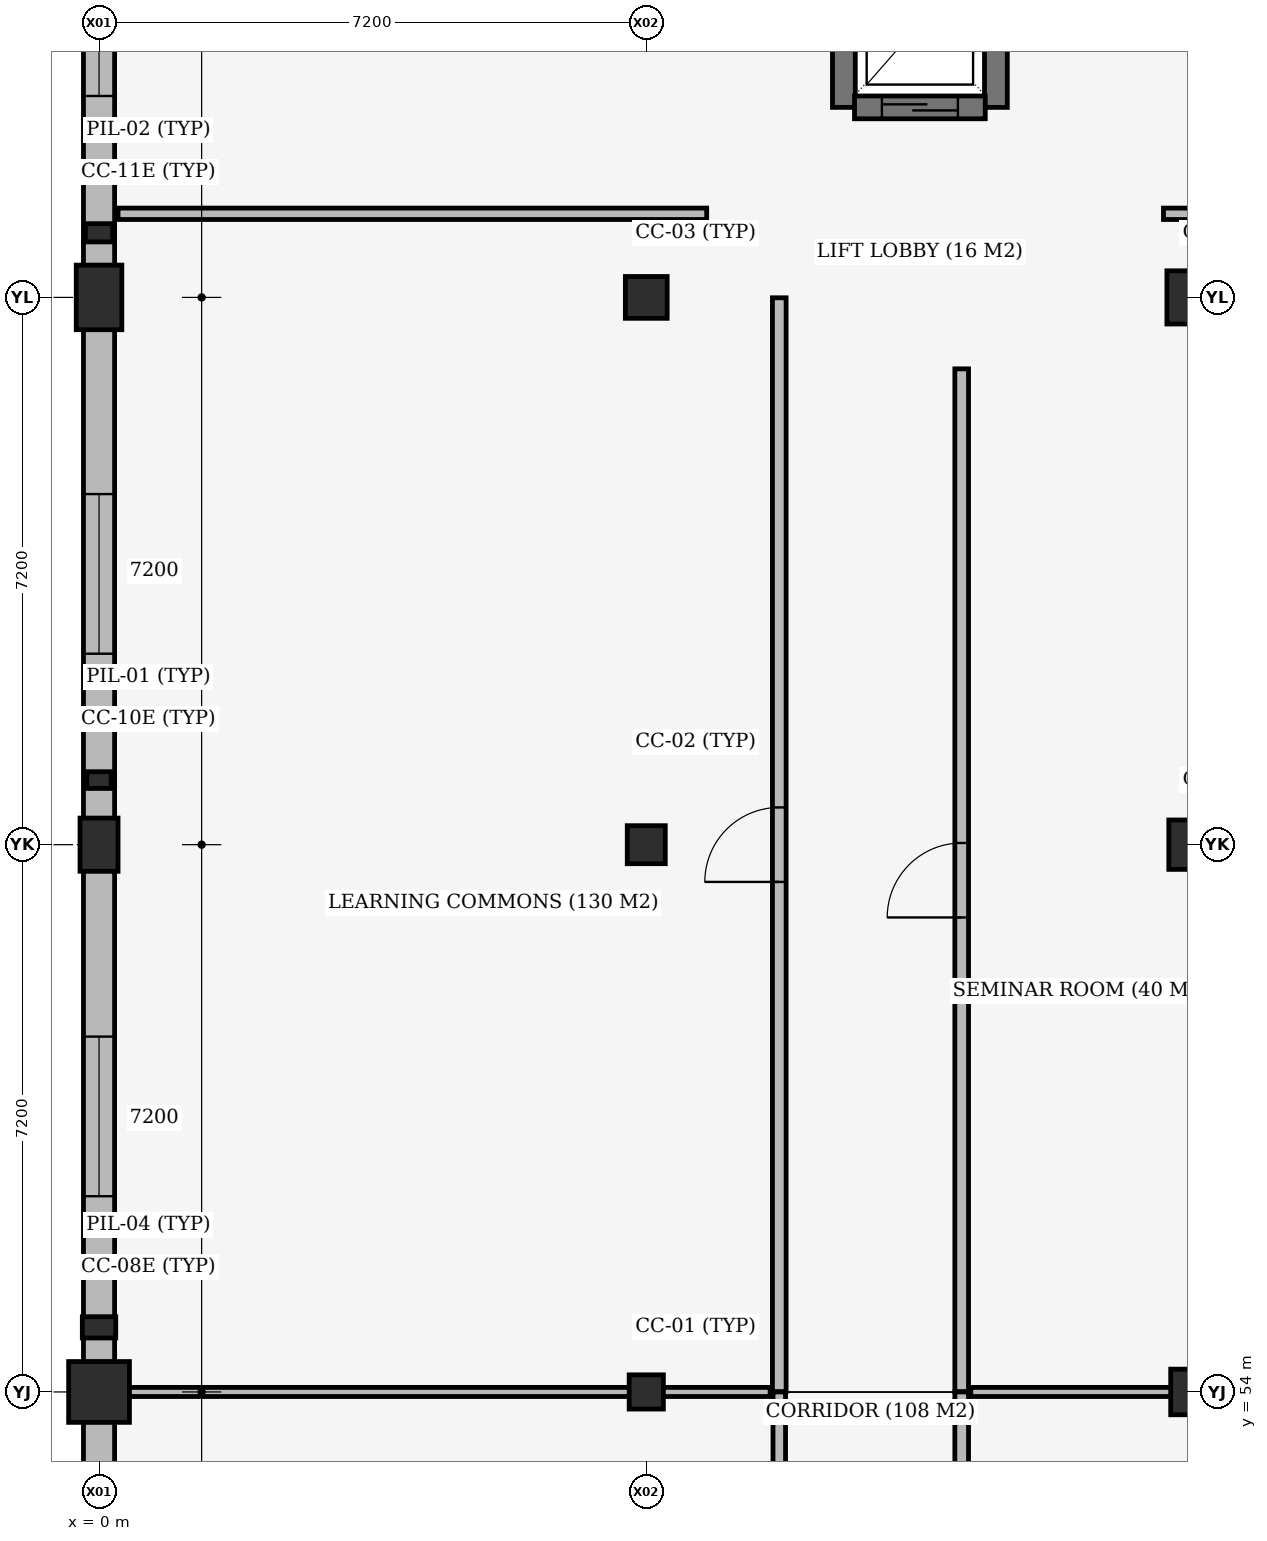
"""IFC4 building model, lengths in metres.
Left out: names, types, materials, properties, quantities, classifications, styles, units other than length and angle.
Written with IfcOpenShell. Run it as: python <this file> out.ifc"""

import sys

from ifc_helpers import new_model, si_unit, direction, frame, frame_2d, origin, origin_2d, place, context, subcontext, project, spatial, rectangle, extrude, element, fill, save


model = new_model("IFC4")
c1 = context("Model", 3, precision=1e-05, world=origin(), true_north=direction((0.0, 1.0)))
c2 = subcontext(c1, "Body", "Model", "MODEL_VIEW")
j1 = project(units=[si_unit("LENGTHUNIT", "METRE"), si_unit("PLANEANGLEUNIT", "RADIAN")], contexts=[c1])
p1 = place(None, origin())
s1 = spatial("IfcSite", under=j1, at=p1, CompositionType="ELEMENT")
p2 = place(p1, origin())
s2 = spatial("IfcBuilding", under=s1, at=p2, CompositionType="ELEMENT")
p3 = place(p2, origin())
s3 = spatial("IfcBuildingStorey", under=s2, at=p3, CompositionType="ELEMENT", Elevation=0.0)
p4 = place(p3, frame((0.0, 54.0, 0.0), z_axis=(0.0, 0.0, 1.0), x_axis=(1.0, 0.0, 0.0)))
e1 = element("IfcColumn", 1, at=p4, inside=s3, PredefinedType="COLUMN", context=c2, shape_type="SweptSolid", body=[
    extrude(rectangle(XDim=0.8, YDim=0.8, at=origin_2d()), origin(), (0.0, 0.0, 1.0), 5.1),
])
p5 = place(p3, frame((0.0, 61.2, 0.0), z_axis=(0.0, 0.0, 1.0), x_axis=(1.0, 0.0, 0.0)))
e2 = element("IfcColumn", 2, at=p5, inside=s3, PredefinedType="COLUMN", context=c2, shape_type="SweptSolid", body=[
    extrude(rectangle(XDim=0.5, YDim=0.7, at=origin_2d()), origin(), (0.0, 0.0, 1.0), 5.1),
])
p6 = place(p3, frame((0.0, 68.4, 0.0), z_axis=(0.0, 0.0, 1.0), x_axis=(1.0, 0.0, 0.0)))
e3 = element("IfcColumn", 3, at=p6, inside=s3, PredefinedType="COLUMN", context=c2, shape_type="SweptSolid", body=[
    extrude(rectangle(XDim=0.6, YDim=0.85, at=origin_2d()), origin(), (0.0, 0.0, 1.0), 5.1),
])
p7 = place(p3, frame((7.2, 54.0, 0.0), z_axis=(0.0, 0.0, 1.0), x_axis=(1.0, 0.0, 0.0)))
e4 = element("IfcColumn", 4, at=p7, inside=s3, PredefinedType="COLUMN", context=c2, shape_type="SweptSolid", body=[
    extrude(rectangle(XDim=0.45, YDim=0.45, at=origin_2d()), origin(), (0.0, 0.0, 1.0), 5.1),
])
p8 = place(p3, frame((7.2, 61.2, 0.0), z_axis=(0.0, 0.0, 1.0), x_axis=(1.0, 0.0, 0.0)))
e5 = element("IfcColumn", 5, at=p8, inside=s3, PredefinedType="COLUMN", context=c2, shape_type="SweptSolid", body=[
    extrude(rectangle(XDim=0.5, YDim=0.5, at=origin_2d()), origin(), (0.0, 0.0, 1.0), 5.1),
])
p9 = place(p3, frame((7.2, 68.4, 0.0), z_axis=(0.0, 0.0, 1.0), x_axis=(1.0, 0.0, 0.0)))
e6 = element("IfcColumn", 6, at=p9, inside=s3, PredefinedType="COLUMN", context=c2, shape_type="SweptSolid", body=[
    extrude(rectangle(XDim=0.55, YDim=0.55, at=origin_2d()), origin(), (0.0, 0.0, 1.0), 5.1),
])
p10 = place(p3, frame((14.4, 54.0, 0.0), z_axis=(0.0, 0.0, 1.0), x_axis=(1.0, 0.0, 0.0)))
e7 = element("IfcColumn", 7, at=p10, inside=s3, PredefinedType="COLUMN", context=c2, shape_type="SweptSolid", body=[
    extrude(rectangle(XDim=0.6, YDim=0.6, at=origin_2d()), origin(), (0.0, 0.0, 1.0), 5.1),
])
p11 = place(p3, frame((14.4, 61.2, 0.0), z_axis=(0.0, 0.0, 1.0), x_axis=(1.0, 0.0, 0.0)))
e8 = element("IfcColumn", 8, at=p11, inside=s3, PredefinedType="COLUMN", context=c2, shape_type="SweptSolid", body=[
    extrude(rectangle(XDim=0.65, YDim=0.65, at=origin_2d()), origin(), (0.0, 0.0, 1.0), 5.1),
])
p12 = place(p3, frame((14.4, 68.4, 0.0), z_axis=(0.0, 0.0, 1.0), x_axis=(1.0, 0.0, 0.0)))
e9 = element("IfcColumn", 9, at=p12, inside=s3, PredefinedType="COLUMN", context=c2, shape_type="SweptSolid", body=[
    extrude(rectangle(XDim=0.7, YDim=0.7, at=origin_2d()), origin(), (0.0, 0.0, 1.0), 5.1),
])
p13 = place(p3, frame((0.0, 54.85, 0.0), z_axis=(0.0, 0.0, 1.0), x_axis=(1.0, 0.0, 0.0)))
e10 = element("IfcColumn", 10, at=p13, inside=s3, PredefinedType="PILASTER", context=c2, shape_type="SweptSolid", body=[
    extrude(rectangle(XDim=0.44, YDim=0.28, at=origin_2d()), origin(), (0.0, 0.0, 1.0), 5.1),
])
p14 = place(p3, frame((0.0, 62.05, 0.0), z_axis=(0.0, 0.0, 1.0), x_axis=(1.0, 0.0, 0.0)))
e11 = element("IfcColumn", 11, at=p14, inside=s3, PredefinedType="PILASTER", context=c2, shape_type="SweptSolid", body=[
    extrude(rectangle(XDim=0.32, YDim=0.22, at=origin_2d()), origin(), (0.0, 0.0, 1.0), 5.1),
])
p15 = place(p3, frame((0.0, 69.25, 0.0), z_axis=(0.0, 0.0, 1.0), x_axis=(1.0, 0.0, 0.0)))
e12 = element("IfcColumn", 12, at=p15, inside=s3, PredefinedType="PILASTER", context=c2, shape_type="SweptSolid", body=[
    extrude(rectangle(XDim=0.36, YDim=0.24, at=origin_2d()), origin(), (0.0, 0.0, 1.0), 5.1),
])
for number, where, z_axis, x_axis in (
    (13, (9.8, 73.1, 0.0), (0.0, 0.0, 1.0), (0.0, -1.0, 0.0)),
    (14, (11.8, 70.9, 0.0), (0.0, 0.0, 1.0), (0.0, 1.0, 0.0)),
):
    element("IfcWall", number, at=place(p3, frame(where, z_axis=z_axis, x_axis=x_axis)), inside=s3, PredefinedType="SHEAR", context=c2, shape_type="SweptSolid", body=[
        extrude(rectangle(XDim=2.2, YDim=0.3, at=frame_2d((1.1, 0.0))), origin(), (0.0, 0.0, 1.0), 5.1),
    ])
p16 = place(p3, frame((0.0, 43.567, 0.0), z_axis=(0.0, 0.0, 1.0), x_axis=(0.0, 1.0, 0.0)))
e15 = element("IfcWall", 15, at=p16, inside=s3, PredefinedType="STANDARD", context=c2, shape_type="SweptSolid", body=[
    extrude(rectangle(XDim=10.041, YDim=0.41, at=frame_2d((5.021, 0.0))), origin(), (0.0, 0.0, 1.0), 4.5),
])
p17 = place(p16, frame((3.97, 0.0, 0.8)))
e16 = element("IfcOpeningElement", 16, at=p17, cuts=e15, PredefinedType="OPENING", context=c2, shape_type="SweptSolid", body=[
    extrude(rectangle(XDim=2.1, YDim=3.0, at=frame_2d((1.05, 1.5))), frame((0.0, 0.215, 0.0), z_axis=(0.0, -1.0, 0.0), x_axis=(1.0, 0.0, 0.0)), (0.0, 0.0, 1.0), 0.43),
])
p18 = place(p3, frame((0.0, 54.392, 0.0), z_axis=(0.0, 0.0, 1.0), x_axis=(0.0, 1.0, 0.0)))
e17 = element("IfcWall", 17, at=p18, inside=s3, PredefinedType="STANDARD", context=c2, shape_type="SweptSolid", body=[
    extrude(rectangle(XDim=6.466, YDim=0.41, at=frame_2d((3.233, 0.0))), origin(), (0.0, 0.0, 1.0), 4.45),
])
p19 = place(p18, frame((2.183, 0.0, 0.8)))
e18 = element("IfcOpeningElement", 18, at=p19, cuts=e17, PredefinedType="OPENING", context=c2, shape_type="SweptSolid", body=[
    extrude(rectangle(XDim=2.1, YDim=3.0, at=frame_2d((1.05, 1.5))), frame((0.0, 0.215, 0.0), z_axis=(0.0, -1.0, 0.0), x_axis=(1.0, 0.0, 0.0)), (0.0, 0.0, 1.0), 0.43),
])
p20 = place(p3, frame((0.0, 61.542, 0.0), z_axis=(0.0, 0.0, 1.0), x_axis=(0.0, 1.0, 0.0)))
e19 = element("IfcWall", 19, at=p20, inside=s3, PredefinedType="STANDARD", context=c2, shape_type="SweptSolid", body=[
    extrude(rectangle(XDim=6.441, YDim=0.41, at=frame_2d((3.22, 0.0))), origin(), (0.0, 0.0, 1.0), 4.4),
])
p21 = place(p20, frame((2.17, 0.0, 0.8)))
e20 = element("IfcOpeningElement", 20, at=p21, cuts=e19, PredefinedType="OPENING", context=c2, shape_type="SweptSolid", body=[
    extrude(rectangle(XDim=2.1, YDim=3.0, at=frame_2d((1.05, 1.5))), frame((0.0, 0.215, 0.0), z_axis=(0.0, -1.0, 0.0), x_axis=(1.0, 0.0, 0.0)), (0.0, 0.0, 1.0), 0.43),
])
p22 = place(p3, frame((0.0, 68.817, 0.0), z_axis=(0.0, 0.0, 1.0), x_axis=(0.0, 1.0, 0.0)))
e21 = element("IfcWall", 21, at=p22, inside=s3, PredefinedType="STANDARD", context=c2, shape_type="SweptSolid", body=[
    extrude(rectangle(XDim=6.566, YDim=0.41, at=frame_2d((3.283, 0.0))), origin(), (0.0, 0.0, 1.0), 4.35),
])
p23 = place(p22, frame((2.233, 0.0, 0.8)))
e22 = element("IfcOpeningElement", 22, at=p23, cuts=e21, PredefinedType="OPENING", context=c2, shape_type="SweptSolid", body=[
    extrude(rectangle(XDim=2.1, YDim=3.0, at=frame_2d((1.05, 1.5))), frame((0.0, 0.215, 0.0), z_axis=(0.0, -1.0, 0.0), x_axis=(1.0, 0.0, 0.0)), (0.0, 0.0, 1.0), 0.43),
])
p24 = place(p3, frame((11.66, 70.9, 0.0), z_axis=(0.0, 0.0, 1.0), x_axis=(-1.0, 0.0, 0.0)))
e23 = element("IfcWall", 23, at=p24, inside=s3, PredefinedType="SHEAR", context=c2, shape_type="SweptSolid", body=[
    extrude(rectangle(XDim=1.72, YDim=0.3, at=frame_2d((0.86, 0.0))), origin(), (0.0, 0.0, 1.0), 5.1),
])
p25 = place(p24, frame((0.36, 0.0, 0.0)))
e24 = element("IfcOpeningElement", 24, at=p25, cuts=e23, PredefinedType="OPENING", context=c2, shape_type="SweptSolid", body=[
    extrude(rectangle(XDim=1.0, YDim=2.1, at=frame_2d((0.5, 1.05))), frame((0.0, 0.16, 0.0), z_axis=(0.0, -1.0, 0.0), x_axis=(1.0, 0.0, 0.0)), (0.0, 0.0, 1.0), 0.32),
])
p26 = place(p3, frame((8.95, 43.205, 0.0), z_axis=(0.0, 0.0, 1.0), x_axis=(0.0, 1.0, 0.0)))
e25 = element("IfcWall", 25, at=p26, inside=s3, PredefinedType="PARTITIONING", context=c2, shape_type="SweptSolid", body=[
    extrude(rectangle(XDim=10.795, YDim=0.165, at=frame_2d((5.397, 0.0))), origin(), (0.0, 0.0, 1.0), 4.3),
])
p27 = place(p26, frame((4.867, 0.0, 0.0)))
e26 = element("IfcOpeningElement", 26, at=p27, cuts=e25, PredefinedType="OPENING", context=c2, shape_type="SweptSolid", body=[
    extrude(rectangle(XDim=1.06, YDim=2.2, at=frame_2d((0.53, 1.1))), frame((0.0, 0.093, 0.0), z_axis=(0.0, -1.0, 0.0), x_axis=(1.0, 0.0, 0.0)), (0.0, 0.0, 1.0), 0.185),
])
p28 = place(p3, frame((0.25, 54.0, 0.0), z_axis=(0.0, 0.0, 1.0), x_axis=(1.0, 0.0, 0.0)))
e27 = element("IfcWall", 27, at=p28, inside=s3, PredefinedType="PARTITIONING", context=c2, shape_type="SweptSolid", body=[
    extrude(rectangle(XDim=8.58, YDim=0.12, at=frame_2d((4.29, 0.0))), origin(), (0.0, 0.0, 1.0), 4.35),
])
p29 = place(p3, frame((8.95, 54.005, 0.0), z_axis=(0.0, 0.0, 1.0), x_axis=(0.0, 1.0, 0.0)))
e28 = element("IfcWall", 28, at=p29, inside=s3, PredefinedType="PARTITIONING", context=c2, shape_type="SweptSolid", body=[
    extrude(rectangle(XDim=14.39, YDim=0.18, at=frame_2d((7.195, 0.0))), origin(), (0.0, 0.0, 1.0), 4.35),
])
p30 = place(p29, frame((6.705, 0.0, 0.0)))
e29 = element("IfcOpeningElement", 29, at=p30, cuts=e28, PredefinedType="OPENING", context=c2, shape_type="SweptSolid", body=[
    extrude(rectangle(XDim=0.98, YDim=2.18, at=frame_2d((0.49, 1.09))), frame((0.0, 0.1, 0.0), z_axis=(0.0, -1.0, 0.0), x_axis=(1.0, 0.0, 0.0)), (0.0, 0.0, 1.0), 0.2),
])
p31 = place(p3, frame((0.25, 69.5, 0.0), z_axis=(0.0, 0.0, 1.0), x_axis=(1.0, 0.0, 0.0)))
e30 = element("IfcWall", 30, at=p31, inside=s3, PredefinedType="PARTITIONING", context=c2, shape_type="SweptSolid", body=[
    extrude(rectangle(XDim=7.745, YDim=0.15, at=frame_2d((3.873, 0.0))), origin(), (0.0, 0.0, 1.0), 4.3),
])
p32 = place(p3, frame((11.35, 41.605, 0.0), z_axis=(0.0, 0.0, 1.0), x_axis=(0.0, 1.0, 0.0)))
e31 = element("IfcWall", 31, at=p32, inside=s3, PredefinedType="PARTITIONING", context=c2, shape_type="SweptSolid", body=[
    extrude(rectangle(XDim=12.395, YDim=0.18, at=frame_2d((6.198, 0.0))), origin(), (0.0, 0.0, 1.0), 4.3),
])
p33 = place(p32, frame((5.702, 0.0, 0.0)))
e32 = element("IfcOpeningElement", 32, at=p33, cuts=e31, PredefinedType="OPENING", context=c2, shape_type="SweptSolid", body=[
    extrude(rectangle(XDim=0.99, YDim=2.18, at=frame_2d((0.495, 1.09))), frame((0.0, 0.1, 0.0), z_axis=(0.0, -1.0, 0.0), x_axis=(1.0, 0.0, 0.0)), (0.0, 0.0, 1.0), 0.2),
])
p34 = place(p3, frame((11.47, 54.0, 0.0), z_axis=(0.0, 0.0, 1.0), x_axis=(1.0, 0.0, 0.0)))
e33 = element("IfcWall", 33, at=p34, inside=s3, PredefinedType="PARTITIONING", context=c2, shape_type="SweptSolid", body=[
    extrude(rectangle(XDim=3.01, YDim=0.12, at=frame_2d((1.505, 0.0))), origin(), (0.0, 0.0, 1.0), 4.3),
])
p35 = place(p3, frame((11.35, 54.005, 0.0), z_axis=(0.0, 0.0, 1.0), x_axis=(0.0, 1.0, 0.0)))
e34 = element("IfcWall", 34, at=p35, inside=s3, PredefinedType="PARTITIONING", context=c2, shape_type="SweptSolid", body=[
    extrude(rectangle(XDim=13.455, YDim=0.18, at=frame_2d((6.728, 0.0))), origin(), (0.0, 0.0, 1.0), 4.35),
])
p36 = place(p35, frame((6.238, 0.0, 0.0)))
e35 = element("IfcOpeningElement", 35, at=p36, cuts=e34, PredefinedType="OPENING", context=c2, shape_type="SweptSolid", body=[
    extrude(rectangle(XDim=0.98, YDim=2.18, at=frame_2d((0.49, 1.09))), frame((0.0, 0.1, 0.0), z_axis=(0.0, -1.0, 0.0), x_axis=(1.0, 0.0, 0.0)), (0.0, 0.0, 1.0), 0.2),
])
p37 = place(p3, frame((14.005, 69.5, 0.0), z_axis=(0.0, 0.0, 1.0), x_axis=(1.0, 0.0, 0.0)))
e36 = element("IfcWall", 36, at=p37, inside=s3, PredefinedType="PARTITIONING", context=c2, shape_type="SweptSolid", body=[
    extrude(rectangle(XDim=16.375, YDim=0.15, at=frame_2d((8.188, 0.0))), origin(), (0.0, 0.0, 1.0), 4.3),
])
p38 = place(p19, origin())
e37 = element("IfcWindow", 37, at=p38, inside=s3, PartitioningType="DOUBLE_PANEL_VERTICAL", PredefinedType="WINDOW", context=c2, shape_type="SweptSolid", body=[
    extrude(rectangle(XDim=2.1, YDim=3.0, at=frame_2d((1.05, 1.5))), frame((0.0, 0.03, 0.0), z_axis=(0.0, -1.0, 0.0), x_axis=(1.0, 0.0, 0.0)), (0.0, 0.0, 1.0), 0.06),
])
fill(e18, e37)
p39 = place(p21, origin())
e38 = element("IfcWindow", 38, at=p39, inside=s3, PartitioningType="DOUBLE_PANEL_VERTICAL", PredefinedType="WINDOW", context=c2, shape_type="SweptSolid", body=[
    extrude(rectangle(XDim=2.1, YDim=3.0, at=frame_2d((1.05, 1.5))), frame((0.0, 0.03, 0.0), z_axis=(0.0, -1.0, 0.0), x_axis=(1.0, 0.0, 0.0)), (0.0, 0.0, 1.0), 0.06),
])
fill(e20, e38)
p40 = place(p23, origin())
e39 = element("IfcWindow", 39, at=p40, inside=s3, PartitioningType="DOUBLE_PANEL_VERTICAL", PredefinedType="WINDOW", context=c2, shape_type="SweptSolid", body=[
    extrude(rectangle(XDim=2.1, YDim=3.0, at=frame_2d((1.05, 1.5))), frame((0.0, 0.03, 0.0), z_axis=(0.0, -1.0, 0.0), x_axis=(1.0, 0.0, 0.0)), (0.0, 0.0, 1.0), 0.06),
])
fill(e22, e39)
p41 = place(p25, origin())
e40 = element("IfcDoor", 40, at=p41, inside=s3, OperationType="SLIDING_TO_LEFT", PredefinedType="DOOR", context=c2, shape_type="SweptSolid", body=[
    extrude(rectangle(XDim=1.0, YDim=2.1, at=frame_2d((0.5, 1.05))), frame((0.0, 0.025, 0.0), z_axis=(0.0, -1.0, 0.0), x_axis=(1.0, 0.0, 0.0)), (0.0, 0.0, 1.0), 0.05),
])
fill(e24, e40)
p42 = place(p30, origin())
e41 = element("IfcDoor", 41, at=p42, inside=s3, OperationType="SINGLE_SWING_LEFT", PredefinedType="DOOR", context=c2, shape_type="SweptSolid", body=[
    extrude(rectangle(XDim=0.98, YDim=2.18, at=frame_2d((0.49, 1.09))), frame((0.0, 0.025, 0.0), z_axis=(0.0, -1.0, 0.0), x_axis=(1.0, 0.0, 0.0)), (0.0, 0.0, 1.0), 0.05),
])
fill(e29, e41)
p43 = place(p36, origin())
e42 = element("IfcDoor", 42, at=p43, inside=s3, OperationType="SINGLE_SWING_LEFT", PredefinedType="DOOR", context=c2, shape_type="SweptSolid", body=[
    extrude(rectangle(XDim=0.98, YDim=2.18, at=frame_2d((0.49, 1.09))), frame((0.0, 0.025, 0.0), z_axis=(0.0, -1.0, 0.0), x_axis=(1.0, 0.0, 0.0)), (0.0, 0.0, 1.0), 0.05),
])
fill(e35, e42)
save(model, sys.argv[1])
